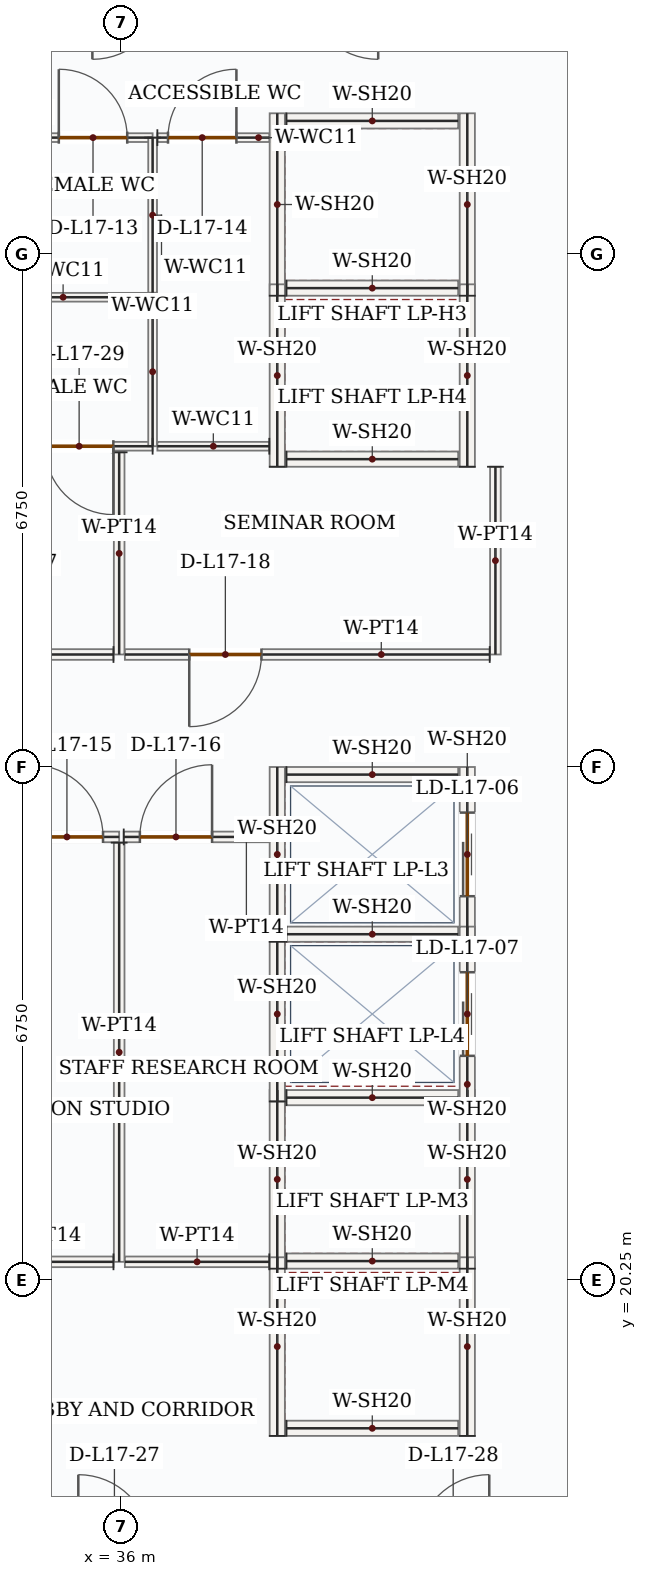
"""IFC4 building model, lengths in metres.
Left out: names, types, materials, properties, quantities, classifications, styles, units other than length and angle.
Written with IfcOpenShell. Run it as: python <this file> out.ifc"""

import sys

from ifc_helpers import new_model, si_unit, direction, frame, frame_2d, origin, place, context, subcontext, project, spatial, rectangle, extrude, source, transform, mapped, element, fill, save


model = new_model("IFC4")
c1 = context("Model", 3, precision=1e-05, world=origin(), true_north=direction((0.0, 1.0)))
c2 = subcontext(c1, "Body", "Model", "MODEL_VIEW")
j1 = project(units=[si_unit("LENGTHUNIT", "METRE"), si_unit("PLANEANGLEUNIT", "RADIAN")], contexts=[c1])
p1 = place(None, origin())
s1 = spatial("IfcSite", under=j1, at=p1, CompositionType="ELEMENT")
p2 = place(p1, origin())
s2 = spatial("IfcBuilding", under=s1, at=p2, CompositionType="ELEMENT")
p3 = place(p2, frame((0.0, 0.0, 79.5)))
s3 = spatial("IfcBuildingStorey", under=s2, at=p3, CompositionType="ELEMENT", Elevation=79.5)
m1 = source(origin(), c2, "Body", "SweptSolid", [
    extrude(rectangle(XDim=2.4, YDim=0.2, at=frame_2d((1.2, 0.0))), origin(), (0.0, 0.0, 1.0), 3.95),
])
for number, where, z_axis, x_axis in (
    (1, (38.05, 33.2, 0.0), (0.0, 0.0, 1.0), (0.0, 1.0, 0.0)),
    (2, (40.55, 33.2, 0.0), (0.0, 0.0, 1.0), (0.0, 1.0, 0.0)),
):
    element("IfcWall", number, at=place(p3, frame(where, z_axis=z_axis, x_axis=x_axis)), inside=s3, PredefinedType="SOLIDWALL", context=c2, shape_type="MappedRepresentation", body=[
        mapped(m1, transform((0.0, 0.0, 0.0), x_axis=(1.0, 0.0, 0.0), y_axis=(0.0, 1.0, 0.0), z_axis=(0.0, 0.0, 1.0), scale=1.0)),
    ])
m2 = source(origin(), c2, "Body", "SweptSolid", [
    extrude(rectangle(XDim=2.26, YDim=0.2, at=frame_2d((1.13, 0.0))), origin(), (0.0, 0.0, 1.0), 3.95),
])
for number, where, z_axis, x_axis in (
    (3, (38.17, 33.3, 0.0), (0.0, 0.0, 1.0), (1.0, 0.0, 0.0)),
    (4, (38.17, 35.5, 0.0), (0.0, 0.0, 1.0), (1.0, 0.0, 0.0)),
):
    element("IfcWall", number, at=place(p3, frame(where, z_axis=z_axis, x_axis=x_axis)), inside=s3, PredefinedType="SOLIDWALL", context=c2, shape_type="MappedRepresentation", body=[
        mapped(m2, transform((0.0, 0.0, 0.0), x_axis=(1.0, 0.0, 0.0), y_axis=(0.0, 1.0, 0.0), z_axis=(0.0, 0.0, 1.0), scale=1.0)),
    ])
for number, where, z_axis, x_axis in (
    (5, (38.05, 30.95, 0.0), (0.0, 0.0, 1.0), (0.0, 1.0, 0.0)),
    (6, (40.55, 30.95, 0.0), (0.0, 0.0, 1.0), (0.0, 1.0, 0.0)),
):
    element("IfcWall", number, at=place(p3, frame(where, z_axis=z_axis, x_axis=x_axis)), inside=s3, PredefinedType="SOLIDWALL", context=c2, shape_type="MappedRepresentation", body=[
        mapped(m1, transform((0.0, 0.0, 0.0), x_axis=(1.0, 0.0, 0.0), y_axis=(0.0, 1.0, 0.0), z_axis=(0.0, 0.0, 1.0), scale=1.0)),
    ])
p4 = place(p3, frame((38.17, 31.05, 0.0), z_axis=(0.0, 0.0, 1.0), x_axis=(1.0, 0.0, 0.0)))
e7 = element("IfcWall", 7, at=p4, inside=s3, PredefinedType="SOLIDWALL", context=c2, shape_type="MappedRepresentation", body=[
    mapped(m2, transform((0.0, 0.0, 0.0), x_axis=(1.0, 0.0, 0.0), y_axis=(0.0, 1.0, 0.0), z_axis=(0.0, 0.0, 1.0), scale=1.0)),
])
m3 = source(origin(), c2, "Body", "SweptSolid", [
    extrude(rectangle(XDim=2.35, YDim=0.2, at=frame_2d((1.175, 0.0))), origin(), (0.0, 0.0, 1.0), 3.95),
])
for number, where, z_axis, x_axis in (
    (8, (38.05, 20.4, 0.0), (0.0, 0.0, 1.0), (0.0, 1.0, 0.0)),
    (9, (40.55, 20.4, 0.0), (0.0, 0.0, 1.0), (0.0, 1.0, 0.0)),
):
    element("IfcWall", number, at=place(p3, frame(where, z_axis=z_axis, x_axis=x_axis)), inside=s3, PredefinedType="SOLIDWALL", context=c2, shape_type="MappedRepresentation", body=[
        mapped(m3, transform((0.0, 0.0, 0.0), x_axis=(1.0, 0.0, 0.0), y_axis=(0.0, 1.0, 0.0), z_axis=(0.0, 0.0, 1.0), scale=1.0)),
    ])
for number, where, z_axis, x_axis in (
    (10, (38.17, 20.5, 0.0), (0.0, 0.0, 1.0), (1.0, 0.0, 0.0)),
    (11, (38.17, 22.65, 0.0), (0.0, 0.0, 1.0), (1.0, 0.0, 0.0)),
):
    element("IfcWall", number, at=place(p3, frame(where, z_axis=z_axis, x_axis=x_axis)), inside=s3, PredefinedType="SOLIDWALL", context=c2, shape_type="MappedRepresentation", body=[
        mapped(m2, transform((0.0, 0.0, 0.0), x_axis=(1.0, 0.0, 0.0), y_axis=(0.0, 1.0, 0.0), z_axis=(0.0, 0.0, 1.0), scale=1.0)),
    ])
for number, where, z_axis, x_axis in (
    (12, (38.05, 18.2, 0.0), (0.0, 0.0, 1.0), (0.0, 1.0, 0.0)),
    (13, (40.55, 18.2, 0.0), (0.0, 0.0, 1.0), (0.0, 1.0, 0.0)),
):
    element("IfcWall", number, at=place(p3, frame(where, z_axis=z_axis, x_axis=x_axis)), inside=s3, PredefinedType="SOLIDWALL", context=c2, shape_type="MappedRepresentation", body=[
        mapped(m3, transform((0.0, 0.0, 0.0), x_axis=(1.0, 0.0, 0.0), y_axis=(0.0, 1.0, 0.0), z_axis=(0.0, 0.0, 1.0), scale=1.0)),
    ])
p5 = place(p3, frame((38.17, 18.3, 0.0), z_axis=(0.0, 0.0, 1.0), x_axis=(1.0, 0.0, 0.0)))
e14 = element("IfcWall", 14, at=p5, inside=s3, PredefinedType="SOLIDWALL", context=c2, shape_type="MappedRepresentation", body=[
    mapped(m2, transform((0.0, 0.0, 0.0), x_axis=(1.0, 0.0, 0.0), y_axis=(0.0, 1.0, 0.0), z_axis=(0.0, 0.0, 1.0), scale=1.0)),
])
m4 = source(origin(), c2, "Body", "SweptSolid", [
    extrude(rectangle(XDim=2.3, YDim=0.2, at=frame_2d((1.15, 0.0))), origin(), (0.0, 0.0, 1.0), 3.95),
])
p6 = place(p3, frame((38.05, 24.7, 0.0), z_axis=(0.0, 0.0, 1.0), x_axis=(0.0, 1.0, 0.0)))
e15 = element("IfcWall", 15, at=p6, inside=s3, PredefinedType="SOLIDWALL", context=c2, shape_type="MappedRepresentation", body=[
    mapped(m4, transform((0.0, 0.0, 0.0), x_axis=(1.0, 0.0, 0.0), y_axis=(0.0, 1.0, 0.0), z_axis=(0.0, 0.0, 1.0), scale=1.0)),
])
p7 = place(p3, frame((40.55, 24.7, 0.0), z_axis=(0.0, 0.0, 1.0), x_axis=(0.0, 1.0, 0.0)))
e16 = element("IfcWall", 16, at=p7, inside=s3, PredefinedType="SOLIDWALL", context=c2, shape_type="SweptSolid", body=[
    extrude(rectangle(XDim=2.3, YDim=0.2, at=frame_2d((1.15, 0.0))), origin(), (0.0, 0.0, 1.0), 3.95),
])
p8 = place(p7, frame((0.6, 0.0, 0.0)))
e17 = element("IfcOpeningElement", 17, at=p8, cuts=e16, PredefinedType="OPENING", context=c2, shape_type="SweptSolid", body=[
    extrude(rectangle(XDim=1.1, YDim=2.15, at=frame_2d((0.55, 1.075))), frame((0.0, 0.11, 0.0), z_axis=(0.0, -1.0, 0.0), x_axis=(1.0, 0.0, 0.0)), (0.0, 0.0, 1.0), 0.22),
])
for number, where, z_axis, x_axis in (
    (18, (38.17, 24.8, 0.0), (0.0, 0.0, 1.0), (1.0, 0.0, 0.0)),
    (19, (38.17, 26.9, 0.0), (0.0, 0.0, 1.0), (1.0, 0.0, 0.0)),
):
    element("IfcWall", number, at=place(p3, frame(where, z_axis=z_axis, x_axis=x_axis)), inside=s3, PredefinedType="SOLIDWALL", context=c2, shape_type="MappedRepresentation", body=[
        mapped(m2, transform((0.0, 0.0, 0.0), x_axis=(1.0, 0.0, 0.0), y_axis=(0.0, 1.0, 0.0), z_axis=(0.0, 0.0, 1.0), scale=1.0)),
    ])
m5 = source(origin(), c2, "Body", "SweptSolid", [
    extrude(rectangle(XDim=2.3, YDim=0.2, at=frame_2d((1.15, 0.0))), origin(), (0.0, 0.0, 1.0), 3.95),
])
p9 = place(p3, frame((38.05, 22.6, 0.0), z_axis=(0.0, 0.0, 1.0), x_axis=(0.0, 1.0, 0.0)))
e20 = element("IfcWall", 20, at=p9, inside=s3, PredefinedType="SOLIDWALL", context=c2, shape_type="MappedRepresentation", body=[
    mapped(m5, transform((0.0, 0.0, 0.0), x_axis=(1.0, 0.0, 0.0), y_axis=(0.0, 1.0, 0.0), z_axis=(0.0, 0.0, 1.0), scale=1.0)),
])
p10 = place(p3, frame((40.55, 22.6, 0.0), z_axis=(0.0, 0.0, 1.0), x_axis=(0.0, 1.0, 0.0)))
e21 = element("IfcWall", 21, at=p10, inside=s3, PredefinedType="SOLIDWALL", context=c2, shape_type="SweptSolid", body=[
    extrude(rectangle(XDim=2.3, YDim=0.2, at=frame_2d((1.15, 0.0))), origin(), (0.0, 0.0, 1.0), 3.95),
])
p11 = place(p10, frame((0.6, 0.0, 0.0)))
e22 = element("IfcOpeningElement", 22, at=p11, cuts=e21, PredefinedType="OPENING", context=c2, shape_type="SweptSolid", body=[
    extrude(rectangle(XDim=1.1, YDim=2.15, at=frame_2d((0.55, 1.075))), frame((0.0, 0.11, 0.0), z_axis=(0.0, -1.0, 0.0), x_axis=(1.0, 0.0, 0.0)), (0.0, 0.0, 1.0), 0.22),
])
p12 = place(p3, frame((36.41, 31.22, 0.0), z_axis=(0.0, 0.0, 1.0), x_axis=(-1.0, 0.0, 0.0)))
e23 = element("IfcWall", 23, at=p12, inside=s3, PredefinedType="PARTITIONING", context=c2, shape_type="SweptSolid", body=[
    extrude(rectangle(XDim=2.355, YDim=0.115, at=frame_2d((1.177, 0.0))), origin(), (0.0, 0.0, 1.0), 3.95),
])
p13 = place(p12, frame((0.517, 0.0, 0.0)))
e24 = element("IfcOpeningElement", 24, at=p13, cuts=e23, PredefinedType="OPENING", context=c2, shape_type="SweptSolid", body=[
    extrude(rectangle(XDim=0.9, YDim=2.1, at=frame_2d((0.45, 1.05))), frame((0.0, 0.067, 0.0), z_axis=(0.0, -1.0, 0.0), x_axis=(1.0, 0.0, 0.0)), (0.0, 0.0, 1.0), 0.135),
])
m6 = source(origin(), c2, "Body", "SweptSolid", [
    extrude(rectangle(XDim=2.355, YDim=0.115, at=frame_2d((1.177, 0.0))), origin(), (0.0, 0.0, 1.0), 3.95),
])
p14 = place(p3, frame((34.055, 33.18, 0.0), z_axis=(0.0, 0.0, 1.0), x_axis=(1.0, 0.0, 0.0)))
e25 = element("IfcWall", 25, at=p14, inside=s3, PredefinedType="PARTITIONING", context=c2, shape_type="MappedRepresentation", body=[
    mapped(m6, transform((0.0, 0.0, 0.0), x_axis=(1.0, 0.0, 0.0), y_axis=(0.0, 1.0, 0.0), z_axis=(0.0, 0.0, 1.0), scale=1.0)),
])
m7 = source(origin(), c2, "Body", "SweptSolid", [
    extrude(rectangle(XDim=1.96, YDim=0.115, at=frame_2d((0.98, 0.0))), origin(), (0.0, 0.0, 1.0), 3.95),
])
p15 = place(p3, frame((36.41, 33.18, 0.0), z_axis=(0.0, 0.0, 1.0), x_axis=(0.0, -1.0, 0.0)))
e26 = element("IfcWall", 26, at=p15, inside=s3, PredefinedType="PARTITIONING", context=c2, shape_type="MappedRepresentation", body=[
    mapped(m7, transform((0.0, 0.0, 0.0), x_axis=(1.0, 0.0, 0.0), y_axis=(0.0, 1.0, 0.0), z_axis=(0.0, 0.0, 1.0), scale=1.0)),
])
p16 = place(p3, frame((34.055, 35.28, 0.0), z_axis=(0.0, 0.0, 1.0), x_axis=(1.0, 0.0, 0.0)))
e27 = element("IfcWall", 27, at=p16, inside=s3, PredefinedType="PARTITIONING", context=c2, shape_type="SweptSolid", body=[
    extrude(rectangle(XDim=2.355, YDim=0.115, at=frame_2d((1.177, 0.0))), origin(), (0.0, 0.0, 1.0), 3.95),
])
p17 = place(p16, frame((1.121, 0.0, 0.0)))
e28 = element("IfcOpeningElement", 28, at=p17, cuts=e27, PredefinedType="OPENING", context=c2, shape_type="SweptSolid", body=[
    extrude(rectangle(XDim=0.9, YDim=2.1, at=frame_2d((0.45, 1.05))), frame((0.0, 0.067, 0.0), z_axis=(0.0, -1.0, 0.0), x_axis=(1.0, 0.0, 0.0)), (0.0, 0.0, 1.0), 0.135),
])
m8 = source(origin(), c2, "Body", "SweptSolid", [
    extrude(rectangle(XDim=2.04, YDim=0.115, at=frame_2d((1.02, 0.0))), origin(), (0.0, 0.0, 1.0), 3.95),
])
p18 = place(p3, frame((36.41, 35.28, 0.0), z_axis=(0.0, 0.0, 1.0), x_axis=(0.0, -1.0, 0.0)))
e29 = element("IfcWall", 29, at=p18, inside=s3, PredefinedType="PARTITIONING", context=c2, shape_type="MappedRepresentation", body=[
    mapped(m8, transform((0.0, 0.0, 0.0), x_axis=(1.0, 0.0, 0.0), y_axis=(0.0, 1.0, 0.0), z_axis=(0.0, 0.0, 1.0), scale=1.0)),
])
m9 = source(origin(), c2, "Body", "SweptSolid", [
    extrude(rectangle(XDim=1.473, YDim=0.115, at=frame_2d((0.736, 0.0))), origin(), (0.0, 0.0, 1.0), 3.95),
])
p19 = place(p3, frame((37.945, 31.22, 0.0), z_axis=(0.0, 0.0, 1.0), x_axis=(-1.0, 0.0, 0.0)))
e30 = element("IfcWall", 30, at=p19, inside=s3, PredefinedType="PARTITIONING", context=c2, shape_type="MappedRepresentation", body=[
    mapped(m9, transform((0.0, 0.0, 0.0), x_axis=(1.0, 0.0, 0.0), y_axis=(0.0, 1.0, 0.0), z_axis=(0.0, 0.0, 1.0), scale=1.0)),
])
p20 = place(p3, frame((36.472, 35.28, 0.0), z_axis=(0.0, 0.0, 1.0), x_axis=(1.0, 0.0, 0.0)))
e31 = element("IfcWall", 31, at=p20, inside=s3, PredefinedType="PARTITIONING", context=c2, shape_type="SweptSolid", body=[
    extrude(rectangle(XDim=1.473, YDim=0.115, at=frame_2d((0.736, 0.0))), origin(), (0.0, 0.0, 1.0), 3.95),
])
p21 = place(p20, frame((0.14, 0.0, 0.0)))
e32 = element("IfcOpeningElement", 32, at=p21, cuts=e31, PredefinedType="OPENING", context=c2, shape_type="SweptSolid", body=[
    extrude(rectangle(XDim=0.9, YDim=2.1, at=frame_2d((0.45, 1.05))), frame((0.0, 0.067, 0.0), z_axis=(0.0, -1.0, 0.0), x_axis=(1.0, 0.0, 0.0)), (0.0, 0.0, 1.0), 0.135),
])
p22 = place(p3, frame((34.055, 26.08, 0.0), z_axis=(0.0, 0.0, 1.0), x_axis=(1.0, 0.0, 0.0)))
e33 = element("IfcWall", 33, at=p22, inside=s3, PredefinedType="PARTITIONING", context=c2, shape_type="SweptSolid", body=[
    extrude(rectangle(XDim=1.915, YDim=0.14, at=frame_2d((0.958, 0.0))), origin(), (0.0, 0.0, 1.0), 3.95),
])
p23 = place(p22, frame((0.753, 0.0, 0.0)))
e34 = element("IfcOpeningElement", 34, at=p23, cuts=e33, PredefinedType="OPENING", context=c2, shape_type="SweptSolid", body=[
    extrude(rectangle(XDim=0.95, YDim=2.15, at=frame_2d((0.475, 1.075))), frame((0.0, 0.08, 0.0), z_axis=(0.0, -1.0, 0.0), x_axis=(1.0, 0.0, 0.0)), (0.0, 0.0, 1.0), 0.16),
])
m10 = source(origin(), c2, "Body", "SweptSolid", [
    extrude(rectangle(XDim=5.515, YDim=0.14, at=frame_2d((2.757, 0.0))), origin(), (0.0, 0.0, 1.0), 3.95),
])
p24 = place(p3, frame((35.97, 26.005, 0.0), z_axis=(0.0, 0.0, 1.0), x_axis=(0.0, -1.0, 0.0)))
e35 = element("IfcWall", 35, at=p24, inside=s3, PredefinedType="PARTITIONING", context=c2, shape_type="MappedRepresentation", body=[
    mapped(m10, transform((0.0, 0.0, 0.0), x_axis=(1.0, 0.0, 0.0), y_axis=(0.0, 1.0, 0.0), z_axis=(0.0, 0.0, 1.0), scale=1.0)),
])
m11 = source(origin(), c2, "Body", "SweptSolid", [
    extrude(rectangle(XDim=1.84, YDim=0.14, at=frame_2d((0.92, 0.0))), origin(), (0.0, 0.0, 1.0), 3.95),
])
p25 = place(p3, frame((35.895, 20.49, 0.0), z_axis=(0.0, 0.0, 1.0), x_axis=(-1.0, 0.0, 0.0)))
e36 = element("IfcWall", 36, at=p25, inside=s3, PredefinedType="PARTITIONING", context=c2, shape_type="MappedRepresentation", body=[
    mapped(m11, transform((0.0, 0.0, 0.0), x_axis=(1.0, 0.0, 0.0), y_axis=(0.0, 1.0, 0.0), z_axis=(0.0, 0.0, 1.0), scale=1.0)),
])
p26 = place(p3, frame((36.03, 26.08, 0.0), z_axis=(0.0, 0.0, 1.0), x_axis=(1.0, 0.0, 0.0)))
e37 = element("IfcWall", 37, at=p26, inside=s3, PredefinedType="PARTITIONING", context=c2, shape_type="SweptSolid", body=[
    extrude(rectangle(XDim=1.915, YDim=0.14, at=frame_2d((0.958, 0.0))), origin(), (0.0, 0.0, 1.0), 3.95),
])
p27 = place(p26, frame((0.212, 0.0, 0.0)))
e38 = element("IfcOpeningElement", 38, at=p27, cuts=e37, PredefinedType="OPENING", context=c2, shape_type="SweptSolid", body=[
    extrude(rectangle(XDim=0.95, YDim=2.15, at=frame_2d((0.475, 1.075))), frame((0.0, 0.08, 0.0), z_axis=(0.0, -1.0, 0.0), x_axis=(1.0, 0.0, 0.0)), (0.0, 0.0, 1.0), 0.16),
])
m12 = source(origin(), c2, "Body", "SweptSolid", [
    extrude(rectangle(XDim=1.9, YDim=0.14, at=frame_2d((0.95, 0.0))), origin(), (0.0, 0.0, 1.0), 3.95),
])
p28 = place(p3, frame((37.945, 20.49, 0.0), z_axis=(0.0, 0.0, 1.0), x_axis=(-1.0, 0.0, 0.0)))
e39 = element("IfcWall", 39, at=p28, inside=s3, PredefinedType="PARTITIONING", context=c2, shape_type="MappedRepresentation", body=[
    mapped(m12, transform((0.0, 0.0, 0.0), x_axis=(1.0, 0.0, 0.0), y_axis=(0.0, 1.0, 0.0), z_axis=(0.0, 0.0, 1.0), scale=1.0)),
])
m13 = source(origin(), c2, "Body", "SweptSolid", [
    extrude(rectangle(XDim=2.66, YDim=0.14, at=frame_2d((1.33, 0.0))), origin(), (0.0, 0.0, 1.0), 3.95),
])
p29 = place(p3, frame((35.97, 31.14, 0.0), z_axis=(0.0, 0.0, 1.0), x_axis=(0.0, -1.0, 0.0)))
e40 = element("IfcWall", 40, at=p29, inside=s3, PredefinedType="PARTITIONING", context=c2, shape_type="MappedRepresentation", body=[
    mapped(m13, transform((0.0, 0.0, 0.0), x_axis=(1.0, 0.0, 0.0), y_axis=(0.0, 1.0, 0.0), z_axis=(0.0, 0.0, 1.0), scale=1.0)),
])
p30 = place(p3, frame((35.895, 28.48, 0.0), z_axis=(0.0, 0.0, 1.0), x_axis=(-1.0, 0.0, 0.0)))
e41 = element("IfcWall", 41, at=p30, inside=s3, PredefinedType="PARTITIONING", context=c2, shape_type="SweptSolid", body=[
    extrude(rectangle(XDim=4.815, YDim=0.14, at=frame_2d((2.407, 0.0))), origin(), (0.0, 0.0, 1.0), 3.95),
])
p31 = place(p30, frame((0.85, 0.0, 0.0)))
e42 = element("IfcOpeningElement", 42, at=p31, cuts=e41, PredefinedType="OPENING", context=c2, shape_type="SweptSolid", body=[
    extrude(rectangle(XDim=0.95, YDim=2.15, at=frame_2d((0.475, 1.075))), frame((0.0, 0.08, 0.0), z_axis=(0.0, -1.0, 0.0), x_axis=(1.0, 0.0, 0.0)), (0.0, 0.0, 1.0), 0.16),
])
m14 = source(origin(), c2, "Body", "SweptSolid", [
    extrude(rectangle(XDim=2.47, YDim=0.14, at=frame_2d((1.235, 0.0))), origin(), (0.0, 0.0, 1.0), 3.95),
])
p32 = place(p3, frame((40.92, 30.95, 0.0), z_axis=(0.0, 0.0, 1.0), x_axis=(0.0, -1.0, 0.0)))
e43 = element("IfcWall", 43, at=p32, inside=s3, PredefinedType="PARTITIONING", context=c2, shape_type="MappedRepresentation", body=[
    mapped(m14, transform((0.0, 0.0, 0.0), x_axis=(1.0, 0.0, 0.0), y_axis=(0.0, 1.0, 0.0), z_axis=(0.0, 0.0, 1.0), scale=1.0)),
])
p33 = place(p3, frame((40.845, 28.48, 0.0), z_axis=(0.0, 0.0, 1.0), x_axis=(-1.0, 0.0, 0.0)))
e44 = element("IfcWall", 44, at=p33, inside=s3, PredefinedType="PARTITIONING", context=c2, shape_type="SweptSolid", body=[
    extrude(rectangle(XDim=4.8, YDim=0.14, at=frame_2d((2.4, 0.0))), origin(), (0.0, 0.0, 1.0), 3.95),
])
p34 = place(p33, frame((3.003, 0.0, 0.0)))
e45 = element("IfcOpeningElement", 45, at=p34, cuts=e44, PredefinedType="OPENING", context=c2, shape_type="SweptSolid", body=[
    extrude(rectangle(XDim=0.95, YDim=2.15, at=frame_2d((0.475, 1.075))), frame((0.0, 0.08, 0.0), z_axis=(0.0, -1.0, 0.0), x_axis=(1.0, 0.0, 0.0)), (0.0, 0.0, 1.0), 0.16),
])
m15 = source(origin(), c2, "Body", "SweptSolid", [
    extrude(rectangle(XDim=1.1, YDim=2.15, at=frame_2d((0.55, 1.075))), frame((0.0, 0.025, 0.0), z_axis=(0.0, -1.0, 0.0), x_axis=(1.0, 0.0, 0.0)), (0.0, 0.0, 1.0), 0.05),
])
p35 = place(p8, origin())
e46 = element("IfcDoor", 46, at=p35, inside=s3, OperationType="DOUBLE_DOOR_SLIDING", PredefinedType="DOOR", context=c2, shape_type="MappedRepresentation", body=[
    mapped(m15, transform((0.0, 0.0, 0.0), x_axis=(1.0, 0.0, 0.0), y_axis=(0.0, 1.0, 0.0), z_axis=(0.0, 0.0, 1.0), scale=1.0)),
])
fill(e17, e46)
p36 = place(p11, origin())
e47 = element("IfcDoor", 47, at=p36, inside=s3, OperationType="DOUBLE_DOOR_SLIDING", PredefinedType="DOOR", context=c2, shape_type="MappedRepresentation", body=[
    mapped(m15, transform((0.0, 0.0, 0.0), x_axis=(1.0, 0.0, 0.0), y_axis=(0.0, 1.0, 0.0), z_axis=(0.0, 0.0, 1.0), scale=1.0)),
])
fill(e22, e47)
m16 = source(origin(), c2, "Body", "SweptSolid", [
    extrude(rectangle(XDim=0.9, YDim=2.1, at=frame_2d((0.45, 1.05))), frame((0.0, 0.025, 0.0), z_axis=(0.0, -1.0, 0.0), x_axis=(1.0, 0.0, 0.0)), (0.0, 0.0, 1.0), 0.05),
])
p37 = place(p17, origin())
e48 = element("IfcDoor", 48, at=p37, inside=s3, OperationType="SINGLE_SWING_LEFT", PredefinedType="DOOR", context=c2, shape_type="MappedRepresentation", body=[
    mapped(m16, transform((0.0, 0.0, 0.0), x_axis=(1.0, 0.0, 0.0), y_axis=(0.0, 1.0, 0.0), z_axis=(0.0, 0.0, 1.0), scale=1.0)),
])
fill(e28, e48)
p38 = place(p21, origin())
e49 = element("IfcDoor", 49, at=p38, inside=s3, OperationType="SINGLE_SWING_RIGHT", PredefinedType="DOOR", context=c2, shape_type="MappedRepresentation", body=[
    mapped(m16, transform((0.0, 0.0, 0.0), x_axis=(1.0, 0.0, 0.0), y_axis=(0.0, 1.0, 0.0), z_axis=(0.0, 0.0, 1.0), scale=1.0)),
])
fill(e32, e49)
m17 = source(origin(), c2, "Body", "SweptSolid", [
    extrude(rectangle(XDim=0.95, YDim=2.15, at=frame_2d((0.475, 1.075))), frame((0.0, 0.025, 0.0), z_axis=(0.0, -1.0, 0.0), x_axis=(1.0, 0.0, 0.0)), (0.0, 0.0, 1.0), 0.05),
])
p39 = place(p23, origin())
e50 = element("IfcDoor", 50, at=p39, inside=s3, OperationType="SINGLE_SWING_LEFT", PredefinedType="DOOR", context=c2, shape_type="MappedRepresentation", body=[
    mapped(m17, transform((0.0, 0.0, 0.0), x_axis=(1.0, 0.0, 0.0), y_axis=(0.0, 1.0, 0.0), z_axis=(0.0, 0.0, 1.0), scale=1.0)),
])
fill(e34, e50)
p40 = place(p27, origin())
e51 = element("IfcDoor", 51, at=p40, inside=s3, OperationType="SINGLE_SWING_RIGHT", PredefinedType="DOOR", context=c2, shape_type="MappedRepresentation", body=[
    mapped(m17, transform((0.0, 0.0, 0.0), x_axis=(1.0, 0.0, 0.0), y_axis=(0.0, 1.0, 0.0), z_axis=(0.0, 0.0, 1.0), scale=1.0)),
])
fill(e38, e51)
p41 = place(p34, origin())
e52 = element("IfcDoor", 52, at=p41, inside=s3, OperationType="SINGLE_SWING_RIGHT", PredefinedType="DOOR", context=c2, shape_type="MappedRepresentation", body=[
    mapped(m17, transform((0.0, 0.0, 0.0), x_axis=(1.0, 0.0, 0.0), y_axis=(0.0, 1.0, 0.0), z_axis=(0.0, 0.0, 1.0), scale=1.0)),
])
fill(e45, e52)
p42 = place(p13, origin())
e53 = element("IfcDoor", 53, at=p42, inside=s3, OperationType="SINGLE_SWING_LEFT", PredefinedType="DOOR", context=c2, shape_type="MappedRepresentation", body=[
    mapped(m16, transform((0.0, 0.0, 0.0), x_axis=(1.0, 0.0, 0.0), y_axis=(0.0, 1.0, 0.0), z_axis=(0.0, 0.0, 1.0), scale=1.0)),
])
fill(e24, e53)
save(model, sys.argv[1])
